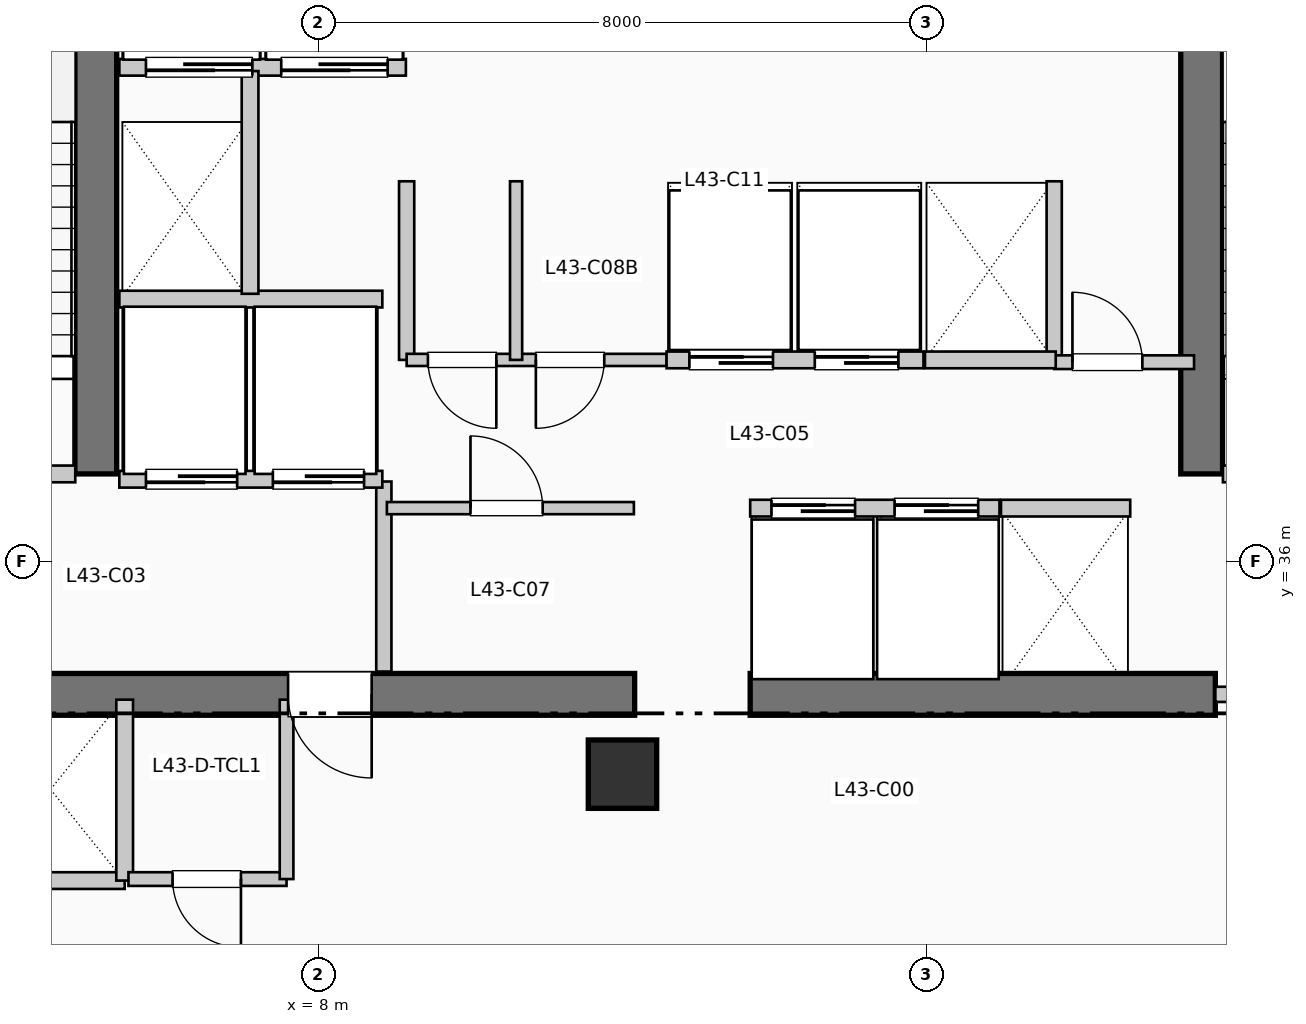
"""IFC4 building model, lengths in metres.
Left out: names, types, materials, properties, quantities, classifications, styles, units other than length and angle.
Written with IfcOpenShell. Run it as: python <this file> out.ifc"""

import sys

from ifc_helpers import new_model, si_unit, direction, frame, frame_2d, origin, origin_2d, place, context, subcontext, project, spatial, rectangle, extrude, element, fill, save


model = new_model("IFC4")
c1 = context("Model", 3, precision=1e-05, world=origin(), true_north=direction((0.0, 1.0)))
c2 = subcontext(c1, "Body", "Model", "MODEL_VIEW")
j1 = project(units=[si_unit("LENGTHUNIT", "METRE"), si_unit("PLANEANGLEUNIT", "RADIAN")], contexts=[c1])
p1 = place(None, origin())
s1 = spatial("IfcSite", under=j1, at=p1, CompositionType="ELEMENT")
p2 = place(p1, origin())
s2 = spatial("IfcBuilding", under=s1, at=p2, CompositionType="ELEMENT")
p3 = place(p2, frame((0.0, 0.0, 179.52)))
s3 = spatial("IfcBuildingStorey", under=s2, at=p3, CompositionType="ELEMENT", Elevation=179.52)
p4 = place(p3, frame((1.45, 34.25, 0.0), z_axis=(0.0, 0.0, 1.0), x_axis=(1.0, 0.0, 0.0)))
e1 = element("IfcWall", 1, at=p4, inside=s3, PredefinedType="SHEAR", context=c2, shape_type="SweptSolid", body=[
    extrude(rectangle(XDim=10.71, YDim=0.55, at=frame_2d((5.355, 0.0))), origin(), (0.0, 0.0, 1.0), 3.96),
])
p5 = place(p4, frame((7.25, 0.0, 0.0), z_axis=(0.0, 0.0, 1.0), x_axis=(-1.0, 0.0, 0.0)))
e2 = element("IfcOpeningElement", 2, at=p5, cuts=e1, PredefinedType="OPENING", context=c2, shape_type="SweptSolid", body=[
    extrude(rectangle(XDim=1.1, YDim=2.15, at=frame_2d((0.55, 1.075))), frame((0.0, 0.285, 0.0), z_axis=(0.0, -1.0, 0.0), x_axis=(1.0, 0.0, 0.0)), (0.0, 0.0, 1.0), 0.57),
])
p6 = place(p3, frame((13.68, 34.25, 0.0), z_axis=(0.0, 0.0, 1.0), x_axis=(1.0, 0.0, 0.0)))
e3 = element("IfcWall", 3, at=p6, inside=s3, PredefinedType="SHEAR", context=c2, shape_type="SweptSolid", body=[
    extrude(rectangle(XDim=6.12, YDim=0.55, at=frame_2d((3.06, 0.0))), origin(), (0.0, 0.0, 1.0), 3.96),
])
for number, where, z_axis, x_axis in (
    (4, (5.07, 37.15, 0.0), (0.0, 0.0, 1.0), (0.0, 1.0, 0.0)),
    (5, (19.62, 37.15, 0.0), (0.0, 0.0, 1.0), (0.0, 1.0, 0.0)),
):
    element("IfcWall", number, at=place(p3, frame(where, z_axis=z_axis, x_axis=x_axis)), inside=s3, PredefinedType="SHEAR", context=c2, shape_type="SweptSolid", body=[
        extrude(rectangle(XDim=7.89, YDim=0.55, at=frame_2d((3.945, 0.0))), origin(), (0.0, 0.0, 1.0), 3.96),
    ])
p7 = place(p3, frame((12.0, 33.2, 0.0), z_axis=(0.0, 0.0, 1.0), x_axis=(1.0, 0.0, 0.0)))
e6 = element("IfcColumn", 6, at=p7, inside=s3, PredefinedType="COLUMN", context=c2, shape_type="SweptSolid", body=[
    extrude(rectangle(XDim=0.9, YDim=0.9, at=origin_2d()), origin(), (0.0, 0.0, 1.0), 3.96),
])
p8 = place(p3, frame((1.65, 37.15, 0.0), z_axis=(0.0, 0.0, 1.0), x_axis=(1.0, 0.0, 0.0)))
e7 = element("IfcWall", 7, at=p8, inside=s3, PredefinedType="PARTITIONING", context=c2, shape_type="SweptSolid", body=[
    extrude(rectangle(XDim=3.15, YDim=0.22, at=frame_2d((1.575, 0.0))), origin(), (0.0, 0.0, 1.0), 3.71),
])
p9 = place(p8, frame((2.05, 0.0, 0.0), z_axis=(0.0, 0.0, 1.0), x_axis=(-1.0, 0.0, 0.0)))
e8 = element("IfcOpeningElement", 8, at=p9, cuts=e7, PredefinedType="OPENING", context=c2, shape_type="SweptSolid", body=[
    extrude(rectangle(XDim=1.05, YDim=2.15, at=frame_2d((0.525, 1.075))), frame((0.0, 0.12, 0.0), z_axis=(0.0, -1.0, 0.0), x_axis=(1.0, 0.0, 0.0)), (0.0, 0.0, 1.0), 0.24),
])
p10 = place(p3, frame((8.86, 34.55, 0.0), z_axis=(0.0, 0.0, 1.0), x_axis=(0.0, 1.0, 0.0)))
e9 = element("IfcWall", 9, at=p10, inside=s3, PredefinedType="PARTITIONING", context=c2, shape_type="SweptSolid", body=[
    extrude(rectangle(XDim=2.5, YDim=0.2, at=frame_2d((1.25, 0.0))), origin(), (0.0, 0.0, 1.0), 3.71),
])
p11 = place(p3, frame((19.9, 37.15, 0.0), z_axis=(0.0, 0.0, 1.0), x_axis=(1.0, 0.0, 0.0)))
e10 = element("IfcWall", 10, at=p11, inside=s3, PredefinedType="PARTITIONING", context=c2, shape_type="SweptSolid", body=[
    extrude(rectangle(XDim=3.15, YDim=0.22, at=frame_2d((1.575, 0.0))), origin(), (0.0, 0.0, 1.0), 3.71),
])
p12 = place(p11, frame((2.05, 0.0, 0.0), z_axis=(0.0, 0.0, 1.0), x_axis=(-1.0, 0.0, 0.0)))
e11 = element("IfcOpeningElement", 11, at=p12, cuts=e10, PredefinedType="OPENING", context=c2, shape_type="SweptSolid", body=[
    extrude(rectangle(XDim=1.05, YDim=2.15, at=frame_2d((0.525, 1.075))), frame((0.0, 0.12, 0.0), z_axis=(0.0, -1.0, 0.0), x_axis=(1.0, 0.0, 0.0)), (0.0, 0.0, 1.0), 0.24),
])
p13 = place(p3, frame((19.8, 34.25, 0.0), z_axis=(0.0, 0.0, 1.0), x_axis=(1.0, 0.0, 0.0)))
e12 = element("IfcWall", 12, at=p13, inside=s3, PredefinedType="PARTITIONING", context=c2, shape_type="SweptSolid", body=[
    extrude(rectangle(XDim=3.25, YDim=0.2, at=frame_2d((1.625, 0.0))), origin(), (0.0, 0.0, 1.0), 3.71),
])
p14 = place(p13, frame((2.15, 0.0, 0.0), z_axis=(0.0, 0.0, 1.0), x_axis=(-1.0, 0.0, 0.0)))
e13 = element("IfcOpeningElement", 13, at=p14, cuts=e12, PredefinedType="OPENING", context=c2, shape_type="SweptSolid", body=[
    extrude(rectangle(XDim=1.1, YDim=2.15, at=frame_2d((0.55, 1.075))), frame((0.0, 0.11, 0.0), z_axis=(0.0, -1.0, 0.0), x_axis=(1.0, 0.0, 0.0)), (0.0, 0.0, 1.0), 0.22),
])
p15 = place(p3, frame((5.38, 37.08, 0.0), z_axis=(0.0, 0.0, 1.0), x_axis=(1.0, 0.0, 0.0)))
e14 = element("IfcWall", 14, at=p15, inside=s3, PredefinedType="PARTITIONING", context=c2, shape_type="SweptSolid", body=[
    extrude(rectangle(XDim=3.46, YDim=0.22, at=frame_2d((1.73, 0.0))), origin(), (0.0, 0.0, 1.0), 3.71),
])
p16 = place(p15, frame((1.55, 0.0, 0.0), z_axis=(0.0, 0.0, 1.0), x_axis=(-1.0, 0.0, 0.0)))
e15 = element("IfcOpeningElement", 15, at=p16, cuts=e14, PredefinedType="OPENING", context=c2, shape_type="SweptSolid", body=[
    extrude(rectangle(XDim=1.2, YDim=2.2, at=frame_2d((0.6, 1.1))), frame((0.0, 0.12, 0.0), z_axis=(0.0, -1.0, 0.0), x_axis=(1.0, 0.0, 0.0)), (0.0, 0.0, 1.0), 0.24),
])
p17 = place(p15, frame((3.22, 0.0, 0.0), z_axis=(0.0, 0.0, 1.0), x_axis=(-1.0, 0.0, 0.0)))
e16 = element("IfcOpeningElement", 16, at=p17, cuts=e14, PredefinedType="OPENING", context=c2, shape_type="SweptSolid", body=[
    extrude(rectangle(XDim=1.2, YDim=2.2, at=frame_2d((0.6, 1.1))), frame((0.0, 0.12, 0.0), z_axis=(0.0, -1.0, 0.0), x_axis=(1.0, 0.0, 0.0)), (0.0, 0.0, 1.0), 0.24),
])
p18 = place(p3, frame((5.38, 39.45, 0.0), z_axis=(0.0, 0.0, 1.0), x_axis=(1.0, 0.0, 0.0)))
e17 = element("IfcWall", 17, at=p18, inside=s3, PredefinedType="PARTITIONING", context=c2, shape_type="SweptSolid", body=[
    extrude(rectangle(XDim=3.46, YDim=0.22, at=frame_2d((1.73, 0.0))), origin(), (0.0, 0.0, 1.0), 3.71),
])
p19 = place(p3, frame((5.38, 42.5, 0.0), z_axis=(0.0, 0.0, 1.0), x_axis=(1.0, 0.0, 0.0)))
e18 = element("IfcWall", 18, at=p19, inside=s3, PredefinedType="PARTITIONING", context=c2, shape_type="SweptSolid", body=[
    extrude(rectangle(XDim=3.77, YDim=0.22, at=frame_2d((1.885, 0.0))), origin(), (0.0, 0.0, 1.0), 3.71),
])
p20 = place(p19, frame((1.75, 0.0, 0.0), z_axis=(0.0, 0.0, 1.0), x_axis=(-1.0, 0.0, 0.0)))
e19 = element("IfcOpeningElement", 19, at=p20, cuts=e18, PredefinedType="OPENING", context=c2, shape_type="SweptSolid", body=[
    extrude(rectangle(XDim=1.4, YDim=2.2, at=frame_2d((0.7, 1.1))), frame((0.0, 0.12, 0.0), z_axis=(0.0, -1.0, 0.0), x_axis=(1.0, 0.0, 0.0)), (0.0, 0.0, 1.0), 0.24),
])
p21 = place(p19, frame((3.53, 0.0, 0.0), z_axis=(0.0, 0.0, 1.0), x_axis=(-1.0, 0.0, 0.0)))
e20 = element("IfcOpeningElement", 20, at=p21, cuts=e18, PredefinedType="OPENING", context=c2, shape_type="SweptSolid", body=[
    extrude(rectangle(XDim=1.4, YDim=2.2, at=frame_2d((0.7, 1.1))), frame((0.0, 0.12, 0.0), z_axis=(0.0, -1.0, 0.0), x_axis=(1.0, 0.0, 0.0)), (0.0, 0.0, 1.0), 0.24),
])
p22 = place(p3, frame((7.1, 39.52, 0.0), z_axis=(0.0, 0.0, 1.0), x_axis=(0.0, 1.0, 0.0)))
e21 = element("IfcWall", 21, at=p22, inside=s3, PredefinedType="PARTITIONING", context=c2, shape_type="SweptSolid", body=[
    extrude(rectangle(XDim=2.93, YDim=0.22, at=frame_2d((1.465, 0.0))), origin(), (0.0, 0.0, 1.0), 3.71),
])
p23 = place(p3, frame((1.55, 31.8, 0.0), z_axis=(0.0, 0.0, 1.0), x_axis=(1.0, 0.0, 0.0)))
e22 = element("IfcWall", 22, at=p23, inside=s3, PredefinedType="PARTITIONING", context=c2, shape_type="SweptSolid", body=[
    extrude(rectangle(XDim=3.9, YDim=0.22, at=frame_2d((1.95, 0.0))), origin(), (0.0, 0.0, 1.0), 3.71),
])
p24 = place(p3, frame((5.45, 31.8, 0.0), z_axis=(0.0, 0.0, 1.0), x_axis=(0.0, 1.0, 0.0)))
e23 = element("IfcWall", 23, at=p24, inside=s3, PredefinedType="PARTITIONING", context=c2, shape_type="SweptSolid", body=[
    extrude(rectangle(XDim=2.38, YDim=0.22, at=frame_2d((1.19, 0.0))), origin(), (0.0, 0.0, 1.0), 3.71),
])
for number, where, z_axis, x_axis in (
    (24, (9.16, 38.65, 0.0), (0.0, 0.0, 1.0), (0.0, 1.0, 0.0)),
    (25, (17.68, 38.65, 0.0), (0.0, 0.0, 1.0), (0.0, 1.0, 0.0)),
):
    element("IfcWall", number, at=place(p3, frame(where, z_axis=z_axis, x_axis=x_axis)), inside=s3, PredefinedType="PARTITIONING", context=c2, shape_type="SweptSolid", body=[
        extrude(rectangle(XDim=2.35, YDim=0.2, at=frame_2d((1.175, 0.0))), origin(), (0.0, 0.0, 1.0), 3.71),
    ])
p25 = place(p3, frame((17.68, 38.62, 0.0), z_axis=(0.0, 0.0, 1.0), x_axis=(1.0, 0.0, 0.0)))
e26 = element("IfcWall", 26, at=p25, inside=s3, PredefinedType="PARTITIONING", context=c2, shape_type="SweptSolid", body=[
    extrude(rectangle(XDim=1.84, YDim=0.18, at=frame_2d((0.92, 0.0))), origin(), (0.0, 0.0, 1.0), 3.71),
])
p26 = place(p25, frame((0.24, 0.0, 0.0)))
e27 = element("IfcOpeningElement", 27, at=p26, cuts=e26, PredefinedType="OPENING", context=c2, shape_type="SweptSolid", body=[
    extrude(rectangle(XDim=0.92, YDim=2.1, at=frame_2d((0.46, 1.05))), frame((0.0, 0.1, 0.0), z_axis=(0.0, -1.0, 0.0), x_axis=(1.0, 0.0, 0.0)), (0.0, 0.0, 1.0), 0.2),
])
p27 = place(p3, frame((5.5, 31.82, 0.0), z_axis=(0.0, 0.0, 1.0), x_axis=(1.0, 0.0, 0.0)))
e28 = element("IfcWall", 28, at=p27, inside=s3, PredefinedType="PLUMBINGWALL", context=c2, shape_type="SweptSolid", body=[
    extrude(rectangle(XDim=2.08, YDim=0.18, at=frame_2d((1.04, 0.0))), origin(), (0.0, 0.0, 1.0), 3.71),
])
p28 = place(p27, frame((1.48, 0.0, 0.0), z_axis=(0.0, 0.0, 1.0), x_axis=(-1.0, 0.0, 0.0)))
e29 = element("IfcOpeningElement", 29, at=p28, cuts=e28, PredefinedType="OPENING", context=c2, shape_type="SweptSolid", body=[
    extrude(rectangle(XDim=0.9, YDim=2.1, at=frame_2d((0.45, 1.05))), frame((0.0, 0.1, 0.0), z_axis=(0.0, -1.0, 0.0), x_axis=(1.0, 0.0, 0.0)), (0.0, 0.0, 1.0), 0.2),
])
p29 = place(p3, frame((7.58, 31.82, 0.0), z_axis=(0.0, 0.0, 1.0), x_axis=(0.0, 1.0, 0.0)))
e30 = element("IfcWall", 30, at=p29, inside=s3, PredefinedType="PLUMBINGWALL", context=c2, shape_type="SweptSolid", body=[
    extrude(rectangle(XDim=2.36, YDim=0.18, at=frame_2d((1.18, 0.0))), origin(), (0.0, 0.0, 1.0), 3.71),
])
p30 = place(p3, frame((8.9, 36.7, 0.0), z_axis=(0.0, 0.0, 1.0), x_axis=(1.0, 0.0, 0.0)))
e31 = element("IfcWall", 31, at=p30, inside=s3, PredefinedType="PARTITIONING", context=c2, shape_type="SweptSolid", body=[
    extrude(rectangle(XDim=3.25, YDim=0.16, at=frame_2d((1.625, 0.0))), origin(), (0.0, 0.0, 1.0), 3.71),
])
p31 = place(p30, frame((1.1, 0.0, 0.0)))
e32 = element("IfcOpeningElement", 32, at=p31, cuts=e31, PredefinedType="OPENING", context=c2, shape_type="SweptSolid", body=[
    extrude(rectangle(XDim=0.95, YDim=2.15, at=frame_2d((0.475, 1.075))), frame((0.0, 0.09, 0.0), z_axis=(0.0, -1.0, 0.0), x_axis=(1.0, 0.0, 0.0)), (0.0, 0.0, 1.0), 0.18),
])
p32 = place(p3, frame((9.16, 38.65, 0.0), z_axis=(0.0, 0.0, 1.0), x_axis=(1.0, 0.0, 0.0)))
e33 = element("IfcWall", 33, at=p32, inside=s3, PredefinedType="PARTITIONING", context=c2, shape_type="SweptSolid", body=[
    extrude(rectangle(XDim=3.42, YDim=0.16, at=frame_2d((1.71, 0.0))), origin(), (0.0, 0.0, 1.0), 3.71),
])
p33 = place(p32, frame((1.18, 0.0, 0.0), z_axis=(0.0, 0.0, 1.0), x_axis=(-1.0, 0.0, 0.0)))
e34 = element("IfcOpeningElement", 34, at=p33, cuts=e33, PredefinedType="OPENING", context=c2, shape_type="SweptSolid", body=[
    extrude(rectangle(XDim=0.9, YDim=2.15, at=frame_2d((0.45, 1.075))), frame((0.0, 0.09, 0.0), z_axis=(0.0, -1.0, 0.0), x_axis=(1.0, 0.0, 0.0)), (0.0, 0.0, 1.0), 0.18),
])
p34 = place(p32, frame((2.6, 0.0, 0.0), z_axis=(0.0, 0.0, 1.0), x_axis=(-1.0, 0.0, 0.0)))
e35 = element("IfcOpeningElement", 35, at=p34, cuts=e33, PredefinedType="OPENING", context=c2, shape_type="SweptSolid", body=[
    extrude(rectangle(XDim=0.9, YDim=2.15, at=frame_2d((0.45, 1.075))), frame((0.0, 0.09, 0.0), z_axis=(0.0, -1.0, 0.0), x_axis=(1.0, 0.0, 0.0)), (0.0, 0.0, 1.0), 0.18),
])
p35 = place(p3, frame((10.6, 38.65, 0.0), z_axis=(0.0, 0.0, 1.0), x_axis=(0.0, 1.0, 0.0)))
e36 = element("IfcWall", 36, at=p35, inside=s3, PredefinedType="PARTITIONING", context=c2, shape_type="SweptSolid", body=[
    extrude(rectangle(XDim=2.35, YDim=0.16, at=frame_2d((1.175, 0.0))), origin(), (0.0, 0.0, 1.0), 3.71),
])
p36 = place(p3, frame((13.68, 36.7, 0.0), z_axis=(0.0, 0.0, 1.0), x_axis=(1.0, 0.0, 0.0)))
e37 = element("IfcWall", 37, at=p36, inside=s3, PredefinedType="PARTITIONING", context=c2, shape_type="SweptSolid", body=[
    extrude(rectangle(XDim=3.28, YDim=0.22, at=frame_2d((1.64, 0.0))), origin(), (0.0, 0.0, 1.0), 3.71),
])
p37 = place(p36, frame((0.28, 0.0, 0.0)))
e38 = element("IfcOpeningElement", 38, at=p37, cuts=e37, PredefinedType="OPENING", context=c2, shape_type="SweptSolid", body=[
    extrude(rectangle(XDim=1.1, YDim=2.2, at=frame_2d((0.55, 1.1))), frame((0.0, 0.12, 0.0), z_axis=(0.0, -1.0, 0.0), x_axis=(1.0, 0.0, 0.0)), (0.0, 0.0, 1.0), 0.24),
])
p38 = place(p36, frame((1.9, 0.0, 0.0)))
e39 = element("IfcOpeningElement", 39, at=p38, cuts=e37, PredefinedType="OPENING", context=c2, shape_type="SweptSolid", body=[
    extrude(rectangle(XDim=1.1, YDim=2.2, at=frame_2d((0.55, 1.1))), frame((0.0, 0.12, 0.0), z_axis=(0.0, -1.0, 0.0), x_axis=(1.0, 0.0, 0.0)), (0.0, 0.0, 1.0), 0.24),
])
p39 = place(p3, frame((12.58, 38.65, 0.0), z_axis=(0.0, 0.0, 1.0), x_axis=(1.0, 0.0, 0.0)))
e40 = element("IfcWall", 40, at=p39, inside=s3, PredefinedType="PARTITIONING", context=c2, shape_type="SweptSolid", body=[
    extrude(rectangle(XDim=3.38, YDim=0.22, at=frame_2d((1.69, 0.0))), origin(), (0.0, 0.0, 1.0), 3.71),
])
p40 = place(p39, frame((0.3, 0.0, 0.0)))
e41 = element("IfcOpeningElement", 41, at=p40, cuts=e40, PredefinedType="OPENING", context=c2, shape_type="SweptSolid", body=[
    extrude(rectangle(XDim=1.1, YDim=2.2, at=frame_2d((0.55, 1.1))), frame((0.0, 0.12, 0.0), z_axis=(0.0, -1.0, 0.0), x_axis=(1.0, 0.0, 0.0)), (0.0, 0.0, 1.0), 0.24),
])
p41 = place(p39, frame((1.95, 0.0, 0.0)))
e42 = element("IfcOpeningElement", 42, at=p41, cuts=e40, PredefinedType="OPENING", context=c2, shape_type="SweptSolid", body=[
    extrude(rectangle(XDim=1.1, YDim=2.2, at=frame_2d((0.55, 1.1))), frame((0.0, 0.12, 0.0), z_axis=(0.0, -1.0, 0.0), x_axis=(1.0, 0.0, 0.0)), (0.0, 0.0, 1.0), 0.24),
])
p42 = place(p3, frame((16.98, 36.7, 0.0), z_axis=(0.0, 0.0, 1.0), x_axis=(1.0, 0.0, 0.0)))
e43 = element("IfcWall", 43, at=p42, inside=s3, PredefinedType="PARTITIONING", context=c2, shape_type="SweptSolid", body=[
    extrude(rectangle(XDim=1.7, YDim=0.22, at=frame_2d((0.85, 0.0))), origin(), (0.0, 0.0, 1.0), 3.71),
])
p43 = place(p3, frame((15.98, 38.65, 0.0), z_axis=(0.0, 0.0, 1.0), x_axis=(1.0, 0.0, 0.0)))
e44 = element("IfcWall", 44, at=p43, inside=s3, PredefinedType="PARTITIONING", context=c2, shape_type="SweptSolid", body=[
    extrude(rectangle(XDim=1.72, YDim=0.22, at=frame_2d((0.86, 0.0))), origin(), (0.0, 0.0, 1.0), 3.71),
])
p44 = place(p5, origin())
e45 = element("IfcDoor", 45, at=p44, inside=s3, OperationType="SINGLE_SWING_RIGHT", PredefinedType="DOOR", context=c2, shape_type="SweptSolid", body=[
    extrude(rectangle(XDim=1.1, YDim=2.15, at=frame_2d((0.55, 1.075))), frame((0.0, 0.025, 0.0), z_axis=(0.0, -1.0, 0.0), x_axis=(1.0, 0.0, 0.0)), (0.0, 0.0, 1.0), 0.05),
])
fill(e2, e45)
p45 = place(p16, origin())
e46 = element("IfcDoor", 46, at=p45, inside=s3, OperationType="SLIDING_TO_RIGHT", PredefinedType="DOOR", context=c2, shape_type="SweptSolid", body=[
    extrude(rectangle(XDim=1.2, YDim=2.2, at=frame_2d((0.6, 1.1))), frame((0.0, 0.025, 0.0), z_axis=(0.0, -1.0, 0.0), x_axis=(1.0, 0.0, 0.0)), (0.0, 0.0, 1.0), 0.05),
])
fill(e15, e46)
p46 = place(p17, origin())
e47 = element("IfcDoor", 47, at=p46, inside=s3, OperationType="SLIDING_TO_RIGHT", PredefinedType="DOOR", context=c2, shape_type="SweptSolid", body=[
    extrude(rectangle(XDim=1.2, YDim=2.2, at=frame_2d((0.6, 1.1))), frame((0.0, 0.025, 0.0), z_axis=(0.0, -1.0, 0.0), x_axis=(1.0, 0.0, 0.0)), (0.0, 0.0, 1.0), 0.05),
])
fill(e16, e47)
p47 = place(p20, origin())
e48 = element("IfcDoor", 48, at=p47, inside=s3, OperationType="SLIDING_TO_LEFT", PredefinedType="DOOR", context=c2, shape_type="SweptSolid", body=[
    extrude(rectangle(XDim=1.4, YDim=2.2, at=frame_2d((0.7, 1.1))), frame((0.0, 0.025, 0.0), z_axis=(0.0, -1.0, 0.0), x_axis=(1.0, 0.0, 0.0)), (0.0, 0.0, 1.0), 0.05),
])
fill(e19, e48)
p48 = place(p21, origin())
e49 = element("IfcDoor", 49, at=p48, inside=s3, OperationType="SLIDING_TO_LEFT", PredefinedType="DOOR", context=c2, shape_type="SweptSolid", body=[
    extrude(rectangle(XDim=1.4, YDim=2.2, at=frame_2d((0.7, 1.1))), frame((0.0, 0.025, 0.0), z_axis=(0.0, -1.0, 0.0), x_axis=(1.0, 0.0, 0.0)), (0.0, 0.0, 1.0), 0.05),
])
fill(e20, e49)
p49 = place(p26, origin())
e50 = element("IfcDoor", 50, at=p49, inside=s3, OperationType="SINGLE_SWING_LEFT", PredefinedType="DOOR", context=c2, shape_type="SweptSolid", body=[
    extrude(rectangle(XDim=0.92, YDim=2.1, at=frame_2d((0.46, 1.05))), frame((0.0, 0.025, 0.0), z_axis=(0.0, -1.0, 0.0), x_axis=(1.0, 0.0, 0.0)), (0.0, 0.0, 1.0), 0.05),
])
fill(e27, e50)
p50 = place(p28, origin())
e51 = element("IfcDoor", 51, at=p50, inside=s3, OperationType="SINGLE_SWING_RIGHT", PredefinedType="DOOR", context=c2, shape_type="SweptSolid", body=[
    extrude(rectangle(XDim=0.9, YDim=2.1, at=frame_2d((0.45, 1.05))), frame((0.0, 0.025, 0.0), z_axis=(0.0, -1.0, 0.0), x_axis=(1.0, 0.0, 0.0)), (0.0, 0.0, 1.0), 0.05),
])
fill(e29, e51)
p51 = place(p31, origin())
e52 = element("IfcDoor", 52, at=p51, inside=s3, OperationType="SINGLE_SWING_LEFT", PredefinedType="DOOR", context=c2, shape_type="SweptSolid", body=[
    extrude(rectangle(XDim=0.95, YDim=2.15, at=frame_2d((0.475, 1.075))), frame((0.0, 0.025, 0.0), z_axis=(0.0, -1.0, 0.0), x_axis=(1.0, 0.0, 0.0)), (0.0, 0.0, 1.0), 0.05),
])
fill(e32, e52)
p52 = place(p33, origin())
e53 = element("IfcDoor", 53, at=p52, inside=s3, OperationType="SINGLE_SWING_RIGHT", PredefinedType="DOOR", context=c2, shape_type="SweptSolid", body=[
    extrude(rectangle(XDim=0.9, YDim=2.15, at=frame_2d((0.45, 1.075))), frame((0.0, 0.025, 0.0), z_axis=(0.0, -1.0, 0.0), x_axis=(1.0, 0.0, 0.0)), (0.0, 0.0, 1.0), 0.05),
])
fill(e34, e53)
p53 = place(p34, origin())
e54 = element("IfcDoor", 54, at=p53, inside=s3, OperationType="SINGLE_SWING_LEFT", PredefinedType="DOOR", context=c2, shape_type="SweptSolid", body=[
    extrude(rectangle(XDim=0.9, YDim=2.15, at=frame_2d((0.45, 1.075))), frame((0.0, 0.025, 0.0), z_axis=(0.0, -1.0, 0.0), x_axis=(1.0, 0.0, 0.0)), (0.0, 0.0, 1.0), 0.05),
])
fill(e35, e54)
p54 = place(p37, origin())
e55 = element("IfcDoor", 55, at=p54, inside=s3, OperationType="SLIDING_TO_RIGHT", PredefinedType="DOOR", context=c2, shape_type="SweptSolid", body=[
    extrude(rectangle(XDim=1.1, YDim=2.2, at=frame_2d((0.55, 1.1))), frame((0.0, 0.025, 0.0), z_axis=(0.0, -1.0, 0.0), x_axis=(1.0, 0.0, 0.0)), (0.0, 0.0, 1.0), 0.05),
])
fill(e38, e55)
p55 = place(p38, origin())
e56 = element("IfcDoor", 56, at=p55, inside=s3, OperationType="SLIDING_TO_RIGHT", PredefinedType="DOOR", context=c2, shape_type="SweptSolid", body=[
    extrude(rectangle(XDim=1.1, YDim=2.2, at=frame_2d((0.55, 1.1))), frame((0.0, 0.025, 0.0), z_axis=(0.0, -1.0, 0.0), x_axis=(1.0, 0.0, 0.0)), (0.0, 0.0, 1.0), 0.05),
])
fill(e39, e56)
p56 = place(p40, origin())
e57 = element("IfcDoor", 57, at=p56, inside=s3, OperationType="SLIDING_TO_RIGHT", PredefinedType="DOOR", context=c2, shape_type="SweptSolid", body=[
    extrude(rectangle(XDim=1.1, YDim=2.2, at=frame_2d((0.55, 1.1))), frame((0.0, 0.025, 0.0), z_axis=(0.0, -1.0, 0.0), x_axis=(1.0, 0.0, 0.0)), (0.0, 0.0, 1.0), 0.05),
])
fill(e41, e57)
p57 = place(p41, origin())
e58 = element("IfcDoor", 58, at=p57, inside=s3, OperationType="SLIDING_TO_RIGHT", PredefinedType="DOOR", context=c2, shape_type="SweptSolid", body=[
    extrude(rectangle(XDim=1.1, YDim=2.2, at=frame_2d((0.55, 1.1))), frame((0.0, 0.025, 0.0), z_axis=(0.0, -1.0, 0.0), x_axis=(1.0, 0.0, 0.0)), (0.0, 0.0, 1.0), 0.05),
])
fill(e42, e58)
save(model, sys.argv[1])
